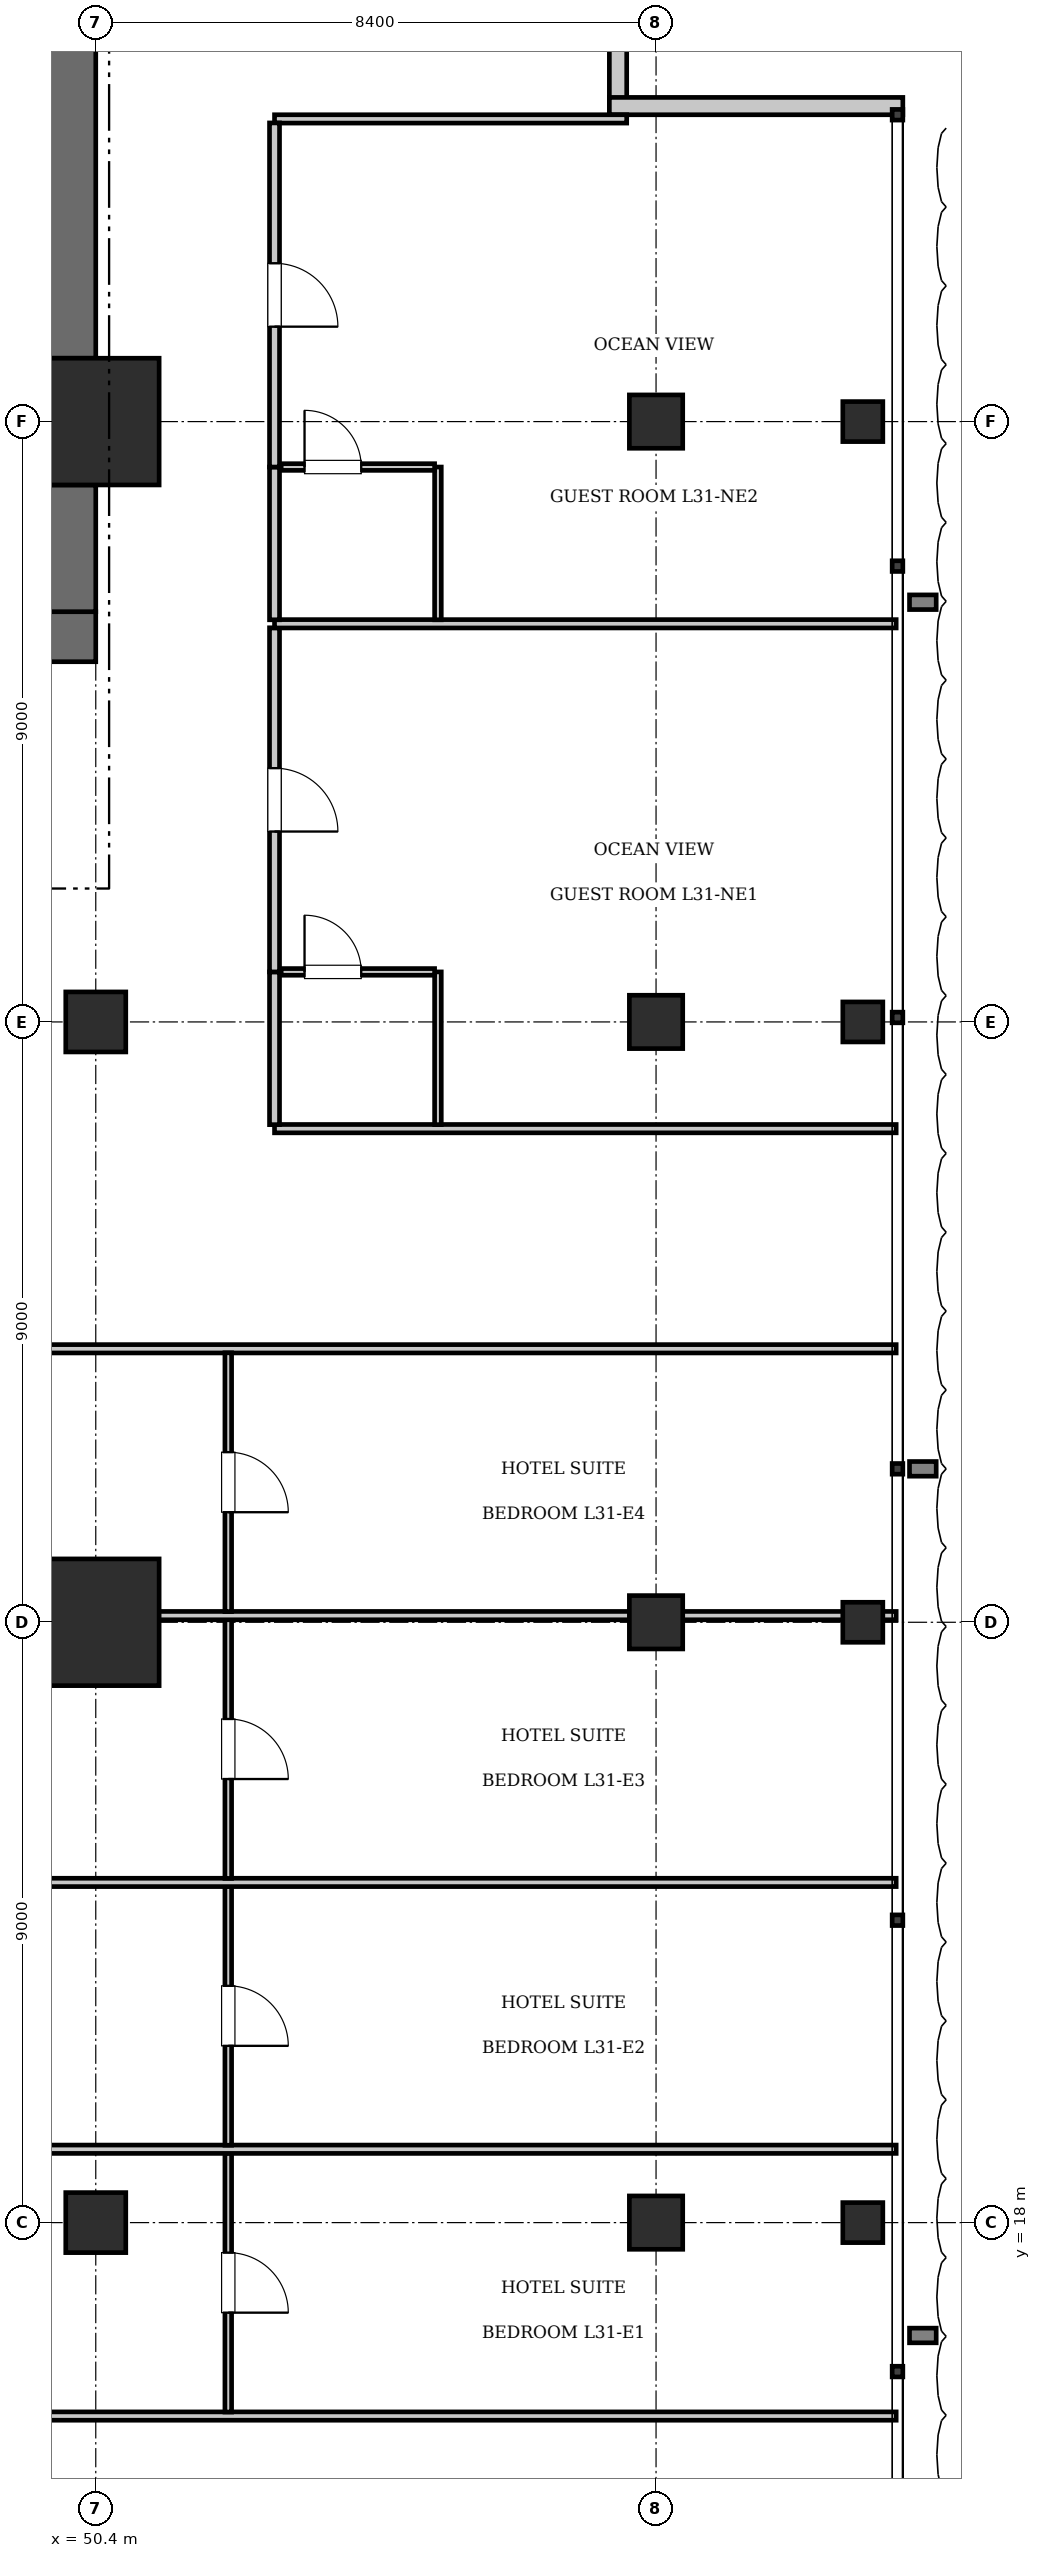
"""IFC4 building model, lengths in metres.
Left out: names, types, materials, properties, quantities, classifications, styles, units other than length and angle.
Written with IfcOpenShell. Run it as: python <this file> out.ifc"""

import sys

from ifc_helpers import new_model, si_unit, direction, frame, frame_2d, origin, origin_2d, place, context, subcontext, project, spatial, rectangle, i_section, extrude, element, fill, save


model = new_model("IFC4")
c1 = context("Model", 3, precision=1e-05, world=origin(), true_north=direction((0.0, 1.0)))
c2 = subcontext(c1, "Body", "Model", "MODEL_VIEW")
j1 = project(units=[si_unit("LENGTHUNIT", "METRE"), si_unit("PLANEANGLEUNIT", "RADIAN")], contexts=[c1])
p1 = place(None, origin())
s1 = spatial("IfcSite", under=j1, at=p1, CompositionType="ELEMENT")
p2 = place(p1, origin())
s2 = spatial("IfcBuilding", under=s1, at=p2, CompositionType="ELEMENT")
p3 = place(p2, frame((0.0, 0.0, 131.25)))
s3 = spatial("IfcBuildingStorey", under=s2, at=p3, CompositionType="ELEMENT", Elevation=131.25)
for number, where, z_axis, x_axis in (
    (1, (50.4, 27.0, 0.0), (0.0, 0.0, 1.0), (1.0, 0.0, 0.0)),
    (2, (50.4, 45.0, 0.0), (0.0, 0.0, 1.0), (1.0, 0.0, 0.0)),
):
    element("IfcColumn", number, at=place(p3, frame(where, z_axis=z_axis, x_axis=x_axis)), inside=s3, PredefinedType="COLUMN", context=c2, shape_type="SweptSolid", body=[
        extrude(rectangle(XDim=1.9, YDim=1.9, at=origin_2d()), origin(), (0.0, 0.0, 1.0), 3.85),
    ])
p4 = place(p3, frame((43.6, 41.775, 0.0), z_axis=(0.0, 0.0, 1.0), x_axis=(1.0, 0.0, 0.0)))
e3 = element("IfcWall", 3, at=p4, inside=s3, PredefinedType="SHEAR", context=c2, shape_type="SweptSolid", body=[
    extrude(rectangle(XDim=6.8, YDim=0.75, at=frame_2d((3.4, 0.0))), origin(), (0.0, 0.0, 1.0), 3.85),
])
p5 = place(p4, frame((3.9, 0.0, 0.0)))
e4 = element("IfcOpeningElement", 4, at=p5, cuts=e3, PredefinedType="OPENING", context=c2, shape_type="SweptSolid", body=[
    extrude(rectangle(XDim=1.15, YDim=2.15, at=frame_2d((0.575, 1.075))), frame((0.0, 0.385, 0.0), z_axis=(0.0, -1.0, 0.0), x_axis=(1.0, 0.0, 0.0)), (0.0, 0.0, 1.0), 0.77),
])
p6 = place(p4, frame((0.55, 0.0, 0.0)))
e5 = element("IfcOpeningElement", 5, at=p6, cuts=e3, PredefinedType="OPENING", context=c2, shape_type="SweptSolid", body=[
    extrude(rectangle(XDim=1.1, YDim=2.2, at=frame_2d((0.55, 1.1))), frame((0.0, 0.385, 0.0), z_axis=(0.0, -1.0, 0.0), x_axis=(1.0, 0.0, 0.0)), (0.0, 0.0, 1.0), 0.77),
])
p7 = place(p3, frame((50.025, 42.15, 0.0), z_axis=(0.0, 0.0, 1.0), x_axis=(0.0, 1.0, 0.0)))
e6 = element("IfcWall", 6, at=p7, inside=s3, PredefinedType="SHEAR", context=c2, shape_type="SweptSolid", body=[
    extrude(rectangle(XDim=1.9, YDim=0.75, at=frame_2d((0.95, 0.0))), origin(), (0.0, 0.0, 1.0), 3.85),
])
p8 = place(p3, frame((50.025, 45.95, 0.0), z_axis=(0.0, 0.0, 1.0), x_axis=(0.0, 1.0, 0.0)))
e7 = element("IfcWall", 7, at=p8, inside=s3, PredefinedType="SHEAR", context=c2, shape_type="SweptSolid", body=[
    extrude(rectangle(XDim=7.3, YDim=0.75, at=frame_2d((3.65, 0.0))), origin(), (0.0, 0.0, 1.0), 3.85),
])
for number, where, z_axis, x_axis in (
    (8, (50.4, 36.0, 0.0), (0.0, 0.0, 1.0), (1.0, 0.0, 0.0)),
    (9, (50.4, 18.0, 0.0), (0.0, 0.0, 1.0), (1.0, 0.0, 0.0)),
):
    element("IfcColumn", number, at=place(p3, frame(where, z_axis=z_axis, x_axis=x_axis)), inside=s3, PredefinedType="COLUMN", context=c2, shape_type="SweptSolid", body=[
        extrude(rectangle(XDim=0.9, YDim=0.9, at=origin_2d()), origin(), (0.0, 0.0, 1.0), 3.85),
    ])
for number, where, z_axis, x_axis in (
    (10, (58.8, 18.0, 0.0), (0.0, 0.0, 1.0), (1.0, 0.0, 0.0)),
    (11, (58.8, 27.0, 0.0), (0.0, 0.0, 1.0), (1.0, 0.0, 0.0)),
    (12, (58.8, 36.0, 0.0), (0.0, 0.0, 1.0), (1.0, 0.0, 0.0)),
    (13, (58.8, 45.0, 0.0), (0.0, 0.0, 1.0), (1.0, 0.0, 0.0)),
):
    element("IfcColumn", number, at=place(p3, frame(where, z_axis=z_axis, x_axis=x_axis)), inside=s3, PredefinedType="COLUMN", context=c2, shape_type="SweptSolid", body=[
        extrude(rectangle(XDim=0.8, YDim=0.8, at=origin_2d()), origin(), (0.0, 0.0, 1.0), 3.85),
    ])
for number, where, z_axis, x_axis in (
    (14, (61.9, 18.0, 0.0), (0.0, 0.0, 1.0), (1.0, 0.0, 0.0)),
    (15, (61.9, 27.0, 0.0), (0.0, 0.0, 1.0), (1.0, 0.0, 0.0)),
    (16, (61.9, 36.0, 0.0), (0.0, 0.0, 1.0), (1.0, 0.0, 0.0)),
    (17, (61.9, 45.0, 0.0), (0.0, 0.0, 1.0), (1.0, 0.0, 0.0)),
):
    element("IfcColumn", number, at=place(p3, frame(where, z_axis=z_axis, x_axis=x_axis)), inside=s3, PredefinedType="COLUMN", context=c2, shape_type="SweptSolid", body=[
        extrude(i_section(OverallWidth=0.6, OverallDepth=0.6, WebThickness=0.025, FlangeThickness=0.038, at=origin_2d()), origin(), (0.0, 0.0, 1.0), 3.85),
    ])
for number, where, z_axis, x_axis in (
    (18, (58.23, 54.0, 0.0), (0.0, 0.0, 1.0), (0.0, -1.0, 0.0)),
    (19, (58.1, 49.73, 0.0), (0.0, 0.0, 1.0), (1.0, 0.0, 0.0)),
):
    element("IfcWall", number, at=place(p3, frame(where, z_axis=z_axis, x_axis=x_axis)), inside=s3, PredefinedType="SOLIDWALL", context=c2, shape_type="SweptSolid", body=[
        extrude(rectangle(XDim=4.4, YDim=0.26, at=frame_2d((2.2, 0.0))), origin(), (0.0, 0.0, 1.0), 3.61),
    ])
for number, where, z_axis, x_axis in (
    (20, (38.98, 15.1, 0.0), (0.0, 0.0, 1.0), (1.0, 0.0, 0.0)),
    (21, (38.98, 31.1, 0.0), (0.0, 0.0, 1.0), (1.0, 0.0, 0.0)),
):
    element("IfcWall", number, at=place(p3, frame(where, z_axis=z_axis, x_axis=x_axis)), inside=s3, PredefinedType="PARTITIONING", context=c2, shape_type="SweptSolid", body=[
        extrude(rectangle(XDim=23.42, YDim=0.125, at=frame_2d((11.71, 0.0))), origin(), (0.0, 0.0, 1.0), 3.61),
    ])
p9 = place(p3, frame((52.386, 15.16, 0.0), z_axis=(0.0, 0.0, 1.0), x_axis=(0.0, 1.0, 0.0)))
e22 = element("IfcWall", 22, at=p9, inside=s3, PredefinedType="PARTITIONING", context=c2, shape_type="SweptSolid", body=[
    extrude(rectangle(XDim=3.88, YDim=0.1, at=frame_2d((1.94, 0.0))), origin(), (0.0, 0.0, 1.0), 3.61),
])
p10 = place(p9, frame((1.49, 0.0, 0.0)))
e23 = element("IfcOpeningElement", 23, at=p10, cuts=e22, PredefinedType="OPENING", context=c2, shape_type="SweptSolid", body=[
    extrude(rectangle(XDim=0.9, YDim=2.1, at=frame_2d((0.45, 1.05))), frame((0.0, 0.06, 0.0), z_axis=(0.0, -1.0, 0.0), x_axis=(1.0, 0.0, 0.0)), (0.0, 0.0, 1.0), 0.12),
])
p11 = place(p3, frame((38.98, 19.1, 0.0), z_axis=(0.0, 0.0, 1.0), x_axis=(1.0, 0.0, 0.0)))
e24 = element("IfcWall", 24, at=p11, inside=s3, PredefinedType="PARTITIONING", context=c2, shape_type="SweptSolid", body=[
    extrude(rectangle(XDim=23.42, YDim=0.125, at=frame_2d((11.71, 0.0))), origin(), (0.0, 0.0, 1.0), 3.61),
])
p12 = place(p3, frame((52.386, 19.16, 0.0), z_axis=(0.0, 0.0, 1.0), x_axis=(0.0, 1.0, 0.0)))
e25 = element("IfcWall", 25, at=p12, inside=s3, PredefinedType="PARTITIONING", context=c2, shape_type="SweptSolid", body=[
    extrude(rectangle(XDim=3.88, YDim=0.1, at=frame_2d((1.94, 0.0))), origin(), (0.0, 0.0, 1.0), 3.61),
])
p13 = place(p12, frame((1.49, 0.0, 0.0)))
e26 = element("IfcOpeningElement", 26, at=p13, cuts=e25, PredefinedType="OPENING", context=c2, shape_type="SweptSolid", body=[
    extrude(rectangle(XDim=0.9, YDim=2.1, at=frame_2d((0.45, 1.05))), frame((0.0, 0.06, 0.0), z_axis=(0.0, -1.0, 0.0), x_axis=(1.0, 0.0, 0.0)), (0.0, 0.0, 1.0), 0.12),
])
p14 = place(p3, frame((38.98, 23.1, 0.0), z_axis=(0.0, 0.0, 1.0), x_axis=(1.0, 0.0, 0.0)))
e27 = element("IfcWall", 27, at=p14, inside=s3, PredefinedType="PARTITIONING", context=c2, shape_type="SweptSolid", body=[
    extrude(rectangle(XDim=23.42, YDim=0.125, at=frame_2d((11.71, 0.0))), origin(), (0.0, 0.0, 1.0), 3.61),
])
p15 = place(p3, frame((52.386, 23.16, 0.0), z_axis=(0.0, 0.0, 1.0), x_axis=(0.0, 1.0, 0.0)))
e28 = element("IfcWall", 28, at=p15, inside=s3, PredefinedType="PARTITIONING", context=c2, shape_type="SweptSolid", body=[
    extrude(rectangle(XDim=3.88, YDim=0.1, at=frame_2d((1.94, 0.0))), origin(), (0.0, 0.0, 1.0), 3.61),
])
p16 = place(p15, frame((1.49, 0.0, 0.0)))
e29 = element("IfcOpeningElement", 29, at=p16, cuts=e28, PredefinedType="OPENING", context=c2, shape_type="SweptSolid", body=[
    extrude(rectangle(XDim=0.9, YDim=2.1, at=frame_2d((0.45, 1.05))), frame((0.0, 0.06, 0.0), z_axis=(0.0, -1.0, 0.0), x_axis=(1.0, 0.0, 0.0)), (0.0, 0.0, 1.0), 0.12),
])
p17 = place(p3, frame((38.98, 27.1, 0.0), z_axis=(0.0, 0.0, 1.0), x_axis=(1.0, 0.0, 0.0)))
e30 = element("IfcWall", 30, at=p17, inside=s3, PredefinedType="PARTITIONING", context=c2, shape_type="SweptSolid", body=[
    extrude(rectangle(XDim=23.42, YDim=0.125, at=frame_2d((11.71, 0.0))), origin(), (0.0, 0.0, 1.0), 2.41),
])
p18 = place(p3, frame((52.386, 27.16, 0.0), z_axis=(0.0, 0.0, 1.0), x_axis=(0.0, 1.0, 0.0)))
e31 = element("IfcWall", 31, at=p18, inside=s3, PredefinedType="PARTITIONING", context=c2, shape_type="SweptSolid", body=[
    extrude(rectangle(XDim=3.88, YDim=0.1, at=frame_2d((1.94, 0.0))), origin(), (0.0, 0.0, 1.0), 3.61),
])
p19 = place(p18, frame((1.49, 0.0, 0.0)))
e32 = element("IfcOpeningElement", 32, at=p19, cuts=e31, PredefinedType="OPENING", context=c2, shape_type="SweptSolid", body=[
    extrude(rectangle(XDim=0.9, YDim=2.1, at=frame_2d((0.45, 1.05))), frame((0.0, 0.06, 0.0), z_axis=(0.0, -1.0, 0.0), x_axis=(1.0, 0.0, 0.0)), (0.0, 0.0, 1.0), 0.12),
])
p20 = place(p3, frame((53.08, 34.4, 0.0), z_axis=(0.0, 0.0, 1.0), x_axis=(1.0, 0.0, 0.0)))
e33 = element("IfcWall", 33, at=p20, inside=s3, PredefinedType="PARTITIONING", context=c2, shape_type="SweptSolid", body=[
    extrude(rectangle(XDim=9.32, YDim=0.125, at=frame_2d((4.66, 0.0))), origin(), (0.0, 0.0, 1.0), 3.61),
])
p21 = place(p3, frame((53.08, 49.538, 0.0), z_axis=(0.0, 0.0, 1.0), x_axis=(1.0, 0.0, 0.0)))
e34 = element("IfcWall", 34, at=p21, inside=s3, PredefinedType="PARTITIONING", context=c2, shape_type="SweptSolid", body=[
    extrude(rectangle(XDim=5.28, YDim=0.125, at=frame_2d((2.64, 0.0))), origin(), (0.0, 0.0, 1.0), 3.61),
])
p22 = place(p3, frame((53.08, 34.46, 0.0), z_axis=(0.0, 0.0, 1.0), x_axis=(0.0, 1.0, 0.0)))
e35 = element("IfcWall", 35, at=p22, inside=s3, PredefinedType="PARTITIONING", context=c2, shape_type="SweptSolid", body=[
    extrude(rectangle(XDim=2.29, YDim=0.15, at=frame_2d((1.145, 0.0))), origin(), (0.0, 0.0, 1.0), 3.61),
])
p23 = place(p3, frame((53.08, 36.75, 0.0), z_axis=(0.0, 0.0, 1.0), x_axis=(0.0, 1.0, 0.0)))
e36 = element("IfcWall", 36, at=p23, inside=s3, PredefinedType="PARTITIONING", context=c2, shape_type="SweptSolid", body=[
    extrude(rectangle(XDim=5.159, YDim=0.15, at=frame_2d((2.579, 0.0))), origin(), (0.0, 0.0, 1.0), 3.61),
])
p24 = place(p23, frame((2.104, 0.0, 0.0)))
e37 = element("IfcOpeningElement", 37, at=p24, cuts=e36, PredefinedType="OPENING", context=c2, shape_type="SweptSolid", body=[
    extrude(rectangle(XDim=0.95, YDim=2.15, at=frame_2d((0.475, 1.075))), frame((0.0, 0.085, 0.0), z_axis=(0.0, -1.0, 0.0), x_axis=(1.0, 0.0, 0.0)), (0.0, 0.0, 1.0), 0.17),
])
p25 = place(p3, frame((55.53, 34.46, 0.0), z_axis=(0.0, 0.0, 1.0), x_axis=(0.0, 1.0, 0.0)))
e38 = element("IfcWall", 38, at=p25, inside=s3, PredefinedType="PARTITIONING", context=c2, shape_type="SweptSolid", body=[
    extrude(rectangle(XDim=2.29, YDim=0.1, at=frame_2d((1.145, 0.0))), origin(), (0.0, 0.0, 1.0), 3.61),
])
p26 = place(p3, frame((53.18, 36.75, 0.0), z_axis=(0.0, 0.0, 1.0), x_axis=(1.0, 0.0, 0.0)))
e39 = element("IfcWall", 39, at=p26, inside=s3, PredefinedType="PARTITIONING", context=c2, shape_type="SweptSolid", body=[
    extrude(rectangle(XDim=2.3, YDim=0.1, at=frame_2d((1.15, 0.0))), origin(), (0.0, 0.0, 1.0), 3.61),
])
p27 = place(p26, frame((0.35, 0.0, 0.0)))
e40 = element("IfcOpeningElement", 40, at=p27, cuts=e39, PredefinedType="OPENING", context=c2, shape_type="SweptSolid", body=[
    extrude(rectangle(XDim=0.85, YDim=2.1, at=frame_2d((0.425, 1.05))), frame((0.0, 0.06, 0.0), z_axis=(0.0, -1.0, 0.0), x_axis=(1.0, 0.0, 0.0)), (0.0, 0.0, 1.0), 0.12),
])
p28 = place(p3, frame((53.08, 41.969, 0.0), z_axis=(0.0, 0.0, 1.0), x_axis=(1.0, 0.0, 0.0)))
e41 = element("IfcWall", 41, at=p28, inside=s3, PredefinedType="PARTITIONING", context=c2, shape_type="SweptSolid", body=[
    extrude(rectangle(XDim=9.32, YDim=0.125, at=frame_2d((4.66, 0.0))), origin(), (0.0, 0.0, 1.0), 3.61),
])
p29 = place(p3, frame((53.08, 42.029, 0.0), z_axis=(0.0, 0.0, 1.0), x_axis=(0.0, 1.0, 0.0)))
e42 = element("IfcWall", 42, at=p29, inside=s3, PredefinedType="PARTITIONING", context=c2, shape_type="SweptSolid", body=[
    extrude(rectangle(XDim=2.29, YDim=0.15, at=frame_2d((1.145, 0.0))), origin(), (0.0, 0.0, 1.0), 3.61),
])
p30 = place(p3, frame((53.08, 44.319, 0.0), z_axis=(0.0, 0.0, 1.0), x_axis=(0.0, 1.0, 0.0)))
e43 = element("IfcWall", 43, at=p30, inside=s3, PredefinedType="PARTITIONING", context=c2, shape_type="SweptSolid", body=[
    extrude(rectangle(XDim=5.159, YDim=0.15, at=frame_2d((2.579, 0.0))), origin(), (0.0, 0.0, 1.0), 3.61),
])
p31 = place(p30, frame((2.104, 0.0, 0.0)))
e44 = element("IfcOpeningElement", 44, at=p31, cuts=e43, PredefinedType="OPENING", context=c2, shape_type="SweptSolid", body=[
    extrude(rectangle(XDim=0.95, YDim=2.15, at=frame_2d((0.475, 1.075))), frame((0.0, 0.085, 0.0), z_axis=(0.0, -1.0, 0.0), x_axis=(1.0, 0.0, 0.0)), (0.0, 0.0, 1.0), 0.17),
])
p32 = place(p3, frame((55.53, 42.029, 0.0), z_axis=(0.0, 0.0, 1.0), x_axis=(0.0, 1.0, 0.0)))
e45 = element("IfcWall", 45, at=p32, inside=s3, PredefinedType="PARTITIONING", context=c2, shape_type="SweptSolid", body=[
    extrude(rectangle(XDim=2.29, YDim=0.1, at=frame_2d((1.145, 0.0))), origin(), (0.0, 0.0, 1.0), 3.61),
])
p33 = place(p3, frame((53.18, 44.319, 0.0), z_axis=(0.0, 0.0, 1.0), x_axis=(1.0, 0.0, 0.0)))
e46 = element("IfcWall", 46, at=p33, inside=s3, PredefinedType="PARTITIONING", context=c2, shape_type="SweptSolid", body=[
    extrude(rectangle(XDim=2.3, YDim=0.1, at=frame_2d((1.15, 0.0))), origin(), (0.0, 0.0, 1.0), 3.61),
])
p34 = place(p33, frame((0.35, 0.0, 0.0)))
e47 = element("IfcOpeningElement", 47, at=p34, cuts=e46, PredefinedType="OPENING", context=c2, shape_type="SweptSolid", body=[
    extrude(rectangle(XDim=0.85, YDim=2.1, at=frame_2d((0.425, 1.05))), frame((0.0, 0.06, 0.0), z_axis=(0.0, -1.0, 0.0), x_axis=(1.0, 0.0, 0.0)), (0.0, 0.0, 1.0), 0.12),
])
p35 = place(p10, frame((0.9, 0.0, 0.0), z_axis=(0.0, 0.0, 1.0), x_axis=(-1.0, 0.0, 0.0)))
e48 = element("IfcDoor", 48, at=p35, inside=s3, OperationType="SINGLE_SWING_RIGHT", PredefinedType="DOOR", context=c2, shape_type="SweptSolid", body=[
    extrude(rectangle(XDim=0.9, YDim=2.1, at=frame_2d((0.45, 1.05))), frame((0.0, 0.025, 0.0), z_axis=(0.0, -1.0, 0.0), x_axis=(1.0, 0.0, 0.0)), (0.0, 0.0, 1.0), 0.05),
])
fill(e23, e48)
p36 = place(p13, frame((0.9, 0.0, 0.0), z_axis=(0.0, 0.0, 1.0), x_axis=(-1.0, 0.0, 0.0)))
e49 = element("IfcDoor", 49, at=p36, inside=s3, OperationType="SINGLE_SWING_RIGHT", PredefinedType="DOOR", context=c2, shape_type="SweptSolid", body=[
    extrude(rectangle(XDim=0.9, YDim=2.1, at=frame_2d((0.45, 1.05))), frame((0.0, 0.025, 0.0), z_axis=(0.0, -1.0, 0.0), x_axis=(1.0, 0.0, 0.0)), (0.0, 0.0, 1.0), 0.05),
])
fill(e26, e49)
p37 = place(p16, frame((0.9, 0.0, 0.0), z_axis=(0.0, 0.0, 1.0), x_axis=(-1.0, 0.0, 0.0)))
e50 = element("IfcDoor", 50, at=p37, inside=s3, OperationType="SINGLE_SWING_RIGHT", PredefinedType="DOOR", context=c2, shape_type="SweptSolid", body=[
    extrude(rectangle(XDim=0.9, YDim=2.1, at=frame_2d((0.45, 1.05))), frame((0.0, 0.025, 0.0), z_axis=(0.0, -1.0, 0.0), x_axis=(1.0, 0.0, 0.0)), (0.0, 0.0, 1.0), 0.05),
])
fill(e29, e50)
p38 = place(p19, frame((0.9, 0.0, 0.0), z_axis=(0.0, 0.0, 1.0), x_axis=(-1.0, 0.0, 0.0)))
e51 = element("IfcDoor", 51, at=p38, inside=s3, OperationType="SINGLE_SWING_RIGHT", PredefinedType="DOOR", context=c2, shape_type="SweptSolid", body=[
    extrude(rectangle(XDim=0.9, YDim=2.1, at=frame_2d((0.45, 1.05))), frame((0.0, 0.025, 0.0), z_axis=(0.0, -1.0, 0.0), x_axis=(1.0, 0.0, 0.0)), (0.0, 0.0, 1.0), 0.05),
])
fill(e32, e51)
p39 = place(p27, origin())
e52 = element("IfcDoor", 52, at=p39, inside=s3, OperationType="SINGLE_SWING_LEFT", PredefinedType="DOOR", context=c2, shape_type="SweptSolid", body=[
    extrude(rectangle(XDim=0.85, YDim=2.1, at=frame_2d((0.425, 1.05))), frame((0.0, 0.025, 0.0), z_axis=(0.0, -1.0, 0.0), x_axis=(1.0, 0.0, 0.0)), (0.0, 0.0, 1.0), 0.05),
])
fill(e40, e52)
p40 = place(p24, frame((0.95, 0.0, 0.0), z_axis=(0.0, 0.0, 1.0), x_axis=(-1.0, 0.0, 0.0)))
e53 = element("IfcDoor", 53, at=p40, inside=s3, OperationType="SINGLE_SWING_RIGHT", PredefinedType="DOOR", context=c2, shape_type="SweptSolid", body=[
    extrude(rectangle(XDim=0.95, YDim=2.15, at=frame_2d((0.475, 1.075))), frame((0.0, 0.025, 0.0), z_axis=(0.0, -1.0, 0.0), x_axis=(1.0, 0.0, 0.0)), (0.0, 0.0, 1.0), 0.05),
])
fill(e37, e53)
p41 = place(p34, origin())
e54 = element("IfcDoor", 54, at=p41, inside=s3, OperationType="SINGLE_SWING_LEFT", PredefinedType="DOOR", context=c2, shape_type="SweptSolid", body=[
    extrude(rectangle(XDim=0.85, YDim=2.1, at=frame_2d((0.425, 1.05))), frame((0.0, 0.025, 0.0), z_axis=(0.0, -1.0, 0.0), x_axis=(1.0, 0.0, 0.0)), (0.0, 0.0, 1.0), 0.05),
])
fill(e47, e54)
p42 = place(p31, frame((0.95, 0.0, 0.0), z_axis=(0.0, 0.0, 1.0), x_axis=(-1.0, 0.0, 0.0)))
e55 = element("IfcDoor", 55, at=p42, inside=s3, OperationType="SINGLE_SWING_RIGHT", PredefinedType="DOOR", context=c2, shape_type="SweptSolid", body=[
    extrude(rectangle(XDim=0.95, YDim=2.15, at=frame_2d((0.475, 1.075))), frame((0.0, 0.025, 0.0), z_axis=(0.0, -1.0, 0.0), x_axis=(1.0, 0.0, 0.0)), (0.0, 0.0, 1.0), 0.05),
])
fill(e44, e55)
save(model, sys.argv[1])
